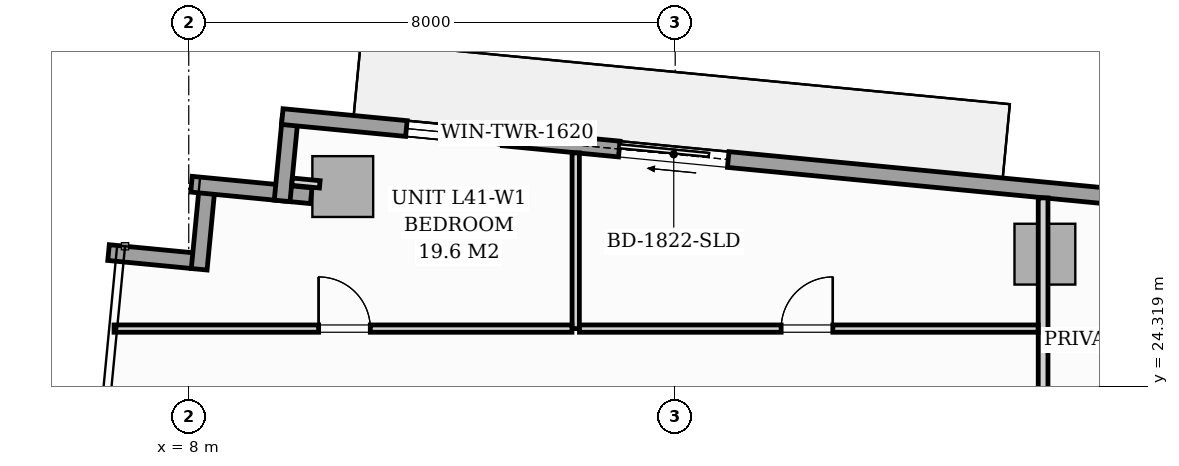
"""IFC4 building model, lengths in metres.
Left out: names, types, materials, properties, quantities, classifications, styles, units other than length and angle.
Written with IfcOpenShell. Run it as: python <this file> out.ifc"""

import sys

from ifc_helpers import new_model, si_unit, direction, frame, frame_2d, origin, origin_2d, place, context, subcontext, project, spatial, rectangle, extrude, source, transform, mapped, element, fill, save


model = new_model("IFC4")
c1 = context("Model", 3, precision=1e-05, world=origin(), true_north=direction((0.0, 1.0)))
c2 = subcontext(c1, "Body", "Model", "MODEL_VIEW")
j1 = project(units=[si_unit("LENGTHUNIT", "METRE"), si_unit("PLANEANGLEUNIT", "RADIAN")], contexts=[c1])
p1 = place(None, origin())
s1 = spatial("IfcSite", under=j1, at=p1, CompositionType="ELEMENT")
p2 = place(p1, origin())
s2 = spatial("IfcBuilding", under=s1, at=p2, CompositionType="ELEMENT")
p3 = place(p2, frame((0.0, 0.0, 143.8)))
s3 = spatial("IfcBuildingStorey", under=s2, at=p3, CompositionType="ELEMENT", Elevation=143.8)
m1 = source(origin(), c2, "Body", "SweptSolid", [
    extrude(rectangle(XDim=1.0, YDim=1.0, at=origin_2d()), origin(), (0.0, 0.0, 1.0), 3.196),
])
for number, where, z_axis, x_axis in (
    (1, (10.533, 27.604, 0.002), (0.0, 0.0, 1.0), (0.995, -0.096, 0.0)),
    (2, (22.08, 26.492, 0.002), (0.0, 0.0, 1.0), (0.995, -0.096, 0.0)),
):
    element("IfcColumn", number, at=place(p3, frame(where, z_axis=z_axis, x_axis=x_axis)), inside=s3, PredefinedType="COLUMN", context=c2, shape_type="MappedRepresentation", body=[
        mapped(m1, transform((0.0, 0.0, 0.0), scale=1.0)),
    ])
p4 = place(p3, frame((6.681, 26.518, 0.0), z_axis=(0.0, 0.0, 1.0), x_axis=(0.995389446633, -0.095915846097, 0.0)))
e3 = element("IfcWall", 3, at=p4, inside=s3, PredefinedType="STANDARD", context=c2, shape_type="SweptSolid", body=[
    extrude(rectangle(XDim=1.395, YDim=0.26, at=frame_2d((0.697, 0.0))), origin(), (0.0, 0.0, 1.0), 2.94),
])
p5 = place(p3, frame((8.172, 26.244, 0.0), z_axis=(0.0, 0.0, 1.0), x_axis=(0.095725744959, 0.99540774648, 0.0)))
e4 = element("IfcWall", 4, at=p5, inside=s3, PredefinedType="STANDARD", context=c2, shape_type="SweptSolid", body=[
    extrude(rectangle(XDim=1.395, YDim=0.26, at=frame_2d((0.698, 0.0))), origin(), (0.0, 0.0, 1.0), 2.94),
])
p6 = place(p3, frame((8.045, 27.643, 0.0), z_axis=(0.0, 0.0, 1.0), x_axis=(0.995391147587, -0.095898192396, 0.0)))
e5 = element("IfcWall", 5, at=p6, inside=s3, PredefinedType="STANDARD", context=c2, shape_type="SweptSolid", body=[
    extrude(rectangle(XDim=1.978, YDim=0.26, at=frame_2d((0.989, 0.0))), origin(), (0.0, 0.0, 1.0), 2.94),
])
p7 = place(p3, frame((9.536, 27.368, 0.0), z_axis=(0.0, 0.0, 1.0), x_axis=(0.095915846097, 0.995389446633, 0.0)))
e6 = element("IfcWall", 6, at=p7, inside=s3, PredefinedType="STANDARD", context=c2, shape_type="SweptSolid", body=[
    extrude(rectangle(XDim=1.395, YDim=0.26, at=frame_2d((0.697, 0.0))), origin(), (0.0, 0.0, 1.0), 2.94),
])
p8 = place(p3, frame((9.539, 28.754, 0.0), z_axis=(0.0, 0.0, 1.0), x_axis=(0.995397345886, -0.09583383433, 0.0)))
e7 = element("IfcWall", 7, at=p8, inside=s3, PredefinedType="STANDARD", context=c2, shape_type="SweptSolid", body=[
    extrude(rectangle(XDim=17.01, YDim=0.26, at=frame_2d((8.505, 0.0))), origin(), (0.0, 0.0, 1.0), 2.94),
])
p9 = place(p8, frame((5.567, 0.0, 0.0)))
e8 = element("IfcOpeningElement", 8, at=p9, cuts=e7, PredefinedType="OPENING", context=c2, shape_type="SweptSolid", body=[
    extrude(rectangle(XDim=1.8, YDim=2.06, at=frame_2d((0.9, 1.03))), frame((0.0, 0.14, 0.0), z_axis=(0.0, -1.0, 0.0), x_axis=(1.0, 0.0, 0.0)), (0.0, 0.0, 1.0), 0.28),
])
p10 = place(p8, frame((2.05, 0.0, 0.65)))
e9 = element("IfcOpeningElement", 9, at=p10, cuts=e7, PredefinedType="OPENING", context=c2, shape_type="SweptSolid", body=[
    extrude(rectangle(XDim=1.6, YDim=1.5, at=frame_2d((0.8, 0.75))), frame((0.0, 0.14, 0.0), z_axis=(0.0, -1.0, 0.0), x_axis=(1.0, 0.0, 0.0)), (0.0, 0.0, 1.0), 0.28),
])
p11 = place(p3, frame((22.05, 12.832, 0.0), z_axis=(0.0, 0.0, 1.0), x_axis=(0.0, 1.0, 0.0)))
e10 = element("IfcWall", 10, at=p11, inside=s3, PredefinedType="PARTITIONING", context=c2, shape_type="SweptSolid", body=[
    extrude(rectangle(XDim=14.585, YDim=0.16, at=frame_2d((7.292, 0.0))), origin(), (0.0, 0.0, 1.0), 2.94),
])
p12 = place(p11, frame((0.493, 0.0, 0.0)))
e11 = element("IfcOpeningElement", 11, at=p12, cuts=e10, PredefinedType="OPENING", context=c2, shape_type="SweptSolid", body=[
    extrude(rectangle(XDim=0.95, YDim=2.06, at=frame_2d((0.475, 1.03))), frame((0.0, 0.09, 0.0), z_axis=(0.0, -1.0, 0.0), x_axis=(1.0, 0.0, 0.0)), (0.0, 0.0, 1.0), 0.18),
])
p13 = place(p3, frame((14.364, 25.268, 0.0), z_axis=(0.0, 0.0, 1.0), x_axis=(0.0, 1.0, 0.0)))
e12 = element("IfcWall", 12, at=p13, inside=s3, PredefinedType="PARTITIONING", context=c2, shape_type="SweptSolid", body=[
    extrude(rectangle(XDim=2.889, YDim=0.12, at=frame_2d((1.445, 0.0))), origin(), (0.0, 0.0, 1.0), 2.94),
])
p14 = place(p3, frame((6.772, 25.268, 0.0), z_axis=(0.0, 0.0, 1.0), x_axis=(1.0, 0.0, 0.0)))
e13 = element("IfcWall", 13, at=p14, inside=s3, PredefinedType="PARTITIONING", context=c2, shape_type="SweptSolid", body=[
    extrude(rectangle(XDim=7.53, YDim=0.12, at=frame_2d((3.765, 0.0))), origin(), (0.0, 0.0, 1.0), 2.94),
])
p15 = place(p14, frame((3.364, 0.0, 0.0)))
e14 = element("IfcOpeningElement", 14, at=p15, cuts=e13, PredefinedType="OPENING", context=c2, shape_type="SweptSolid", body=[
    extrude(rectangle(XDim=0.85, YDim=2.05, at=frame_2d((0.425, 1.025))), frame((0.0, 0.07, 0.0), z_axis=(0.0, -1.0, 0.0), x_axis=(1.0, 0.0, 0.0)), (0.0, 0.0, 1.0), 0.14),
])
p16 = place(p3, frame((14.426, 25.268, 0.0), z_axis=(0.0, 0.0, 1.0), x_axis=(1.0, 0.0, 0.0)))
e15 = element("IfcWall", 15, at=p16, inside=s3, PredefinedType="PARTITIONING", context=c2, shape_type="SweptSolid", body=[
    extrude(rectangle(XDim=7.542, YDim=0.12, at=frame_2d((3.771, 0.0))), origin(), (0.0, 0.0, 1.0), 2.94),
])
p17 = place(p16, frame((3.316, 0.0, 0.0)))
e16 = element("IfcOpeningElement", 16, at=p17, cuts=e15, PredefinedType="OPENING", context=c2, shape_type="SweptSolid", body=[
    extrude(rectangle(XDim=0.85, YDim=2.05, at=frame_2d((0.425, 1.025))), frame((0.0, 0.07, 0.0), z_axis=(0.0, -1.0, 0.0), x_axis=(1.0, 0.0, 0.0)), (0.0, 0.0, 1.0), 0.14),
])
p18 = place(p3, frame((10.155, 27.64, 0.0), z_axis=(0.0, 0.0, 1.0), x_axis=(-0.995435366701, 0.095438098896, 0.0)))
e17 = element("IfcWall", 17, at=p18, inside=s3, PredefinedType="PARTITIONING", context=c2, shape_type="SweptSolid", body=[
    extrude(rectangle(XDim=0.458, YDim=0.12, at=frame_2d((0.229, 0.0))), origin(), (0.0, 0.0, 1.0), 2.94),
])
m2 = source(origin(), c2, "Body", "SweptSolid", [
    extrude(rectangle(XDim=1.8, YDim=2.06, at=frame_2d((0.9, 1.03))), frame((0.0, 0.025, 0.0), z_axis=(0.0, -1.0, 0.0), x_axis=(1.0, 0.0, 0.0)), (0.0, 0.0, 1.0), 0.05),
])
p19 = place(p9, origin())
e18 = element("IfcDoor", 18, at=p19, inside=s3, OperationType="SLIDING_TO_LEFT", PredefinedType="DOOR", context=c2, shape_type="MappedRepresentation", body=[
    mapped(m2, transform((0.0, 0.0, 0.0), scale=1.0)),
])
fill(e8, e18)
m3 = source(origin(), c2, "Body", "SweptSolid", [
    extrude(rectangle(XDim=1.6, YDim=1.5, at=frame_2d((0.8, 0.75))), frame((0.0, 0.03, 0.0), z_axis=(0.0, -1.0, 0.0), x_axis=(1.0, 0.0, 0.0)), (0.0, 0.0, 1.0), 0.06),
])
p20 = place(p10, origin())
e19 = element("IfcWindow", 19, at=p20, inside=s3, PartitioningType="SINGLE_PANEL", PredefinedType="WINDOW", context=c2, shape_type="MappedRepresentation", body=[
    mapped(m3, transform((0.0, 0.0, 0.0), scale=1.0)),
])
fill(e9, e19)
m4 = source(origin(), c2, "Body", "SweptSolid", [
    extrude(rectangle(XDim=0.85, YDim=2.05, at=frame_2d((0.425, 1.025))), frame((0.0, 0.025, 0.0), z_axis=(0.0, -1.0, 0.0), x_axis=(1.0, 0.0, 0.0)), (0.0, 0.0, 1.0), 0.05),
])
p21 = place(p15, origin())
e20 = element("IfcDoor", 20, at=p21, inside=s3, OperationType="SINGLE_SWING_LEFT", PredefinedType="DOOR", context=c2, shape_type="MappedRepresentation", body=[
    mapped(m4, transform((0.0, 0.0, 0.0), scale=1.0)),
])
fill(e14, e20)
p22 = place(p17, origin())
e21 = element("IfcDoor", 21, at=p22, inside=s3, OperationType="SINGLE_SWING_RIGHT", PredefinedType="DOOR", context=c2, shape_type="MappedRepresentation", body=[
    mapped(m4, transform((0.0, 0.0, 0.0), scale=1.0)),
])
fill(e16, e21)
save(model, sys.argv[1])
